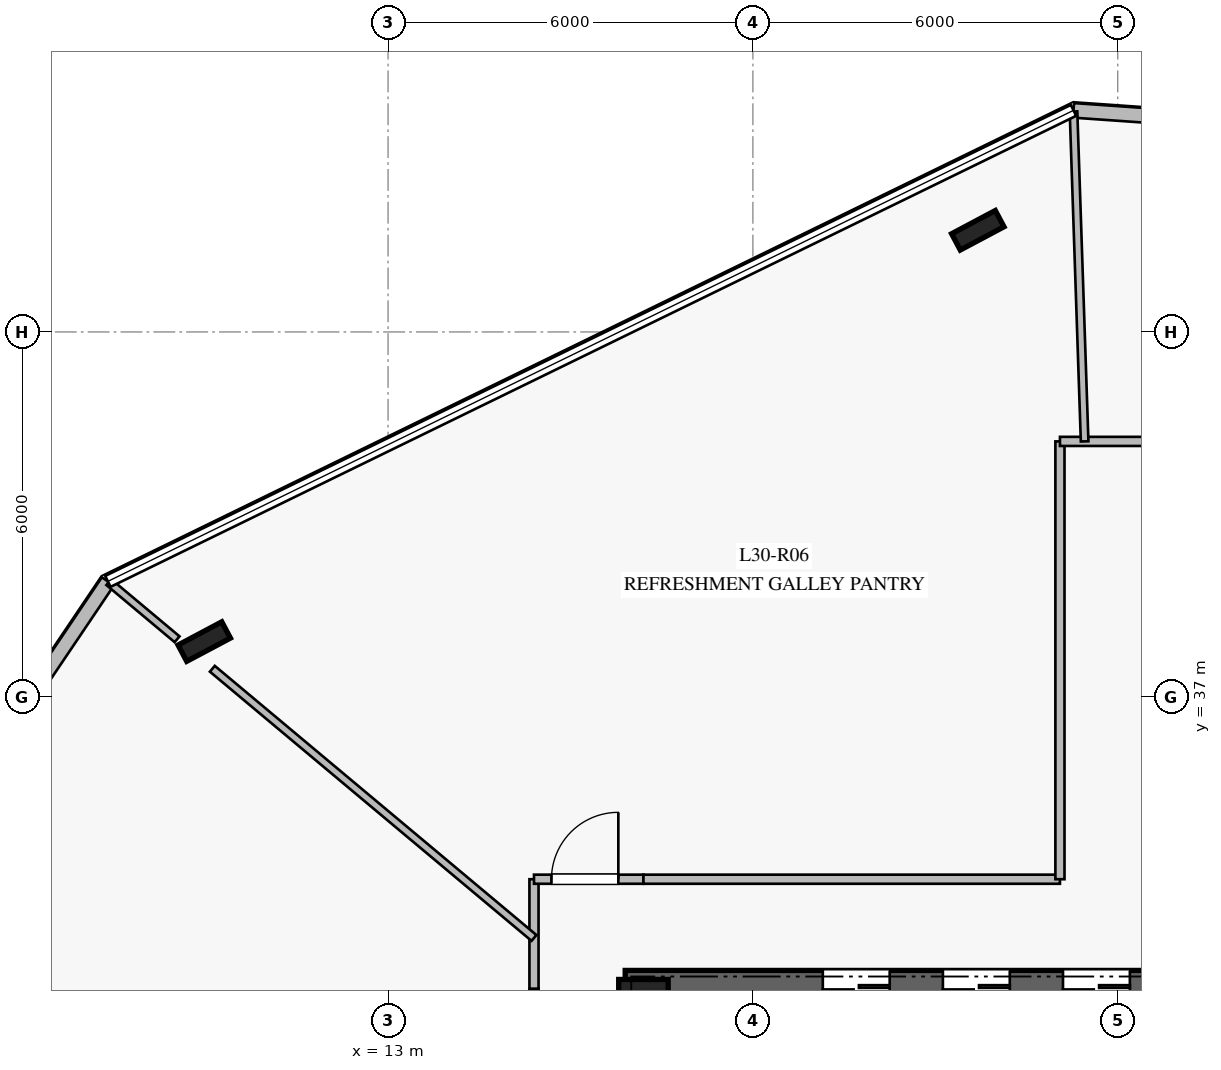
"""IFC4 building model, lengths in metres.
Left out: names, types, materials, properties, quantities, classifications, styles, units other than length and angle.
Written with IfcOpenShell. Run it as: python <this file> out.ifc"""

import sys

from ifc_helpers import new_model, si_unit, direction, frame, frame_2d, origin, origin_2d, place, context, subcontext, project, spatial, rectangle, i_section, extrude, element, fill, save


model = new_model("IFC4")
c1 = context("Model", 3, precision=1e-05, world=origin(), true_north=direction((0.0, 1.0)))
c2 = subcontext(c1, "Body", "Model", "MODEL_VIEW")
j1 = project(units=[si_unit("LENGTHUNIT", "METRE"), si_unit("PLANEANGLEUNIT", "RADIAN")], contexts=[c1])
p1 = place(None, origin())
s1 = spatial("IfcSite", under=j1, at=p1, CompositionType="ELEMENT")
p2 = place(p1, origin())
s2 = spatial("IfcBuilding", under=s1, at=p2, CompositionType="ELEMENT")
p3 = place(p2, frame((0.0, 0.0, 126.4)))
s3 = spatial("IfcBuildingStorey", under=s2, at=p3, CompositionType="ELEMENT", Elevation=126.4)
p4 = place(p3, frame((33.1, 32.2, 0.0), z_axis=(0.0, 0.0, 1.0), x_axis=(-1.0, 0.0, 0.0)))
e1 = element("IfcWall", 1, at=p4, inside=s3, PredefinedType="SHEAR", context=c2, shape_type="SweptSolid", body=[
    extrude(rectangle(XDim=16.2, YDim=0.6, at=frame_2d((8.1, 0.0))), origin(), (0.0, 0.0, 1.0), 3.76),
])
p5 = place(p4, frame((5.05, 0.0, 0.0)))
e2 = element("IfcOpeningElement", 2, at=p5, cuts=e1, PredefinedType="OPENING", context=c2, shape_type="SweptSolid", body=[
    extrude(rectangle(XDim=1.2, YDim=2.25, at=frame_2d((0.6, 1.125))), frame((0.0, 0.31, 0.0), z_axis=(0.0, -1.0, 0.0), x_axis=(1.0, 0.0, 0.0)), (0.0, 0.0, 1.0), 0.62),
])
p6 = place(p4, frame((11.85, 0.0, 0.0)))
e3 = element("IfcOpeningElement", 3, at=p6, cuts=e1, PredefinedType="OPENING", context=c2, shape_type="SweptSolid", body=[
    extrude(rectangle(XDim=1.1, YDim=2.2, at=frame_2d((0.55, 1.1))), frame((0.0, 0.31, 0.0), z_axis=(0.0, -1.0, 0.0), x_axis=(1.0, 0.0, 0.0)), (0.0, 0.0, 1.0), 0.62),
])
p7 = place(p4, frame((9.875, 0.0, 0.0)))
e4 = element("IfcOpeningElement", 4, at=p7, cuts=e1, PredefinedType="OPENING", context=c2, shape_type="SweptSolid", body=[
    extrude(rectangle(XDim=1.1, YDim=2.2, at=frame_2d((0.55, 1.1))), frame((0.0, 0.31, 0.0), z_axis=(0.0, -1.0, 0.0), x_axis=(1.0, 0.0, 0.0)), (0.0, 0.0, 1.0), 0.62),
])
p8 = place(p4, frame((7.9, 0.0, 0.0)))
e5 = element("IfcOpeningElement", 5, at=p8, cuts=e1, PredefinedType="OPENING", context=c2, shape_type="SweptSolid", body=[
    extrude(rectangle(XDim=1.1, YDim=2.2, at=frame_2d((0.55, 1.1))), frame((0.0, 0.31, 0.0), z_axis=(0.0, -1.0, 0.0), x_axis=(1.0, 0.0, 0.0)), (0.0, 0.0, 1.0), 0.62),
])
for number, where, z_axis, x_axis in (
    (6, (17.2, 32.2, 0.0), (0.0, 0.0, 1.0), (1.0, 0.0, 0.0)),
    (7, (22.699, 44.672, 0.0), (0.0, 0.0, 1.0), (0.883, 0.469, 0.0)),
    (8, (9.977, 37.908, 0.0), (0.0, 0.0, 1.0), (0.883, 0.469, 0.0)),
):
    element("IfcColumn", number, at=place(p3, frame(where, z_axis=z_axis, x_axis=x_axis)), inside=s3, PredefinedType="COLUMN", context=c2, shape_type="SweptSolid", body=[
        extrude(i_section(OverallWidth=0.303, OverallDepth=0.814, WebThickness=0.021, FlangeThickness=0.04, at=origin_2d()), origin(), (0.0, 0.0, 1.0), 4.0),
    ])
p9 = place(p3, frame((28.733, 46.332, 0.0), z_axis=(0.0, 0.0, 1.0), x_axis=(-0.997561857217, 0.069787828636, 0.0)))
e9 = element("IfcWall", 9, at=p9, inside=s3, PredefinedType="STANDARD", context=c2, shape_type="SweptSolid", body=[
    extrude(rectangle(XDim=4.471, YDim=0.24, at=frame_2d((2.235, 0.0))), origin(), (0.0, 0.0, 1.0), 3.76),
])
p10 = place(p3, frame((8.392, 38.898, 0.0), z_axis=(0.0, 0.0, 1.0), x_axis=(-0.559078804203, -0.82911452206, 0.0)))
e10 = element("IfcWall", 10, at=p10, inside=s3, PredefinedType="STANDARD", context=c2, shape_type="SweptSolid", body=[
    extrude(rectangle(XDim=4.47, YDim=0.24, at=frame_2d((2.235, 0.0))), origin(), (0.0, 0.0, 1.0), 3.76),
])
p11 = place(p3, frame((15.4, 25.95, 0.0), z_axis=(0.0, 0.0, 1.0), x_axis=(0.0, 1.0, 0.0)))
e11 = element("IfcWall", 11, at=p11, inside=s3, PredefinedType="PARTITIONING", context=c2, shape_type="SweptSolid", body=[
    extrude(rectangle(XDim=6.25, YDim=0.15, at=frame_2d((3.125, 0.0))), origin(), (0.0, 0.0, 1.0), 3.21),
])
p12 = place(p3, frame((15.4, 32.2, 0.0), z_axis=(0.0, 0.0, 1.0), x_axis=(0.0, 1.0, 0.0)))
e12 = element("IfcWall", 12, at=p12, inside=s3, PredefinedType="PARTITIONING", context=c2, shape_type="SweptSolid", body=[
    extrude(rectangle(XDim=1.8, YDim=0.15, at=frame_2d((0.9, 0.0))), origin(), (0.0, 0.0, 1.0), 3.21),
])
p13 = place(p3, frame((15.4, 34.0, 0.0), z_axis=(0.0, 0.0, 1.0), x_axis=(1.0, 0.0, 0.0)))
e13 = element("IfcWall", 13, at=p13, inside=s3, PredefinedType="PARTITIONING", context=c2, shape_type="SweptSolid", body=[
    extrude(rectangle(XDim=1.8, YDim=0.15, at=frame_2d((0.9, 0.0))), origin(), (0.0, 0.0, 1.0), 3.76),
])
p14 = place(p13, frame((0.287, 0.0, 0.0)))
e14 = element("IfcOpeningElement", 14, at=p14, cuts=e13, PredefinedType="OPENING", context=c2, shape_type="SweptSolid", body=[
    extrude(rectangle(XDim=1.1, YDim=2.2, at=frame_2d((0.55, 1.1))), frame((0.0, 0.085, 0.0), z_axis=(0.0, -1.0, 0.0), x_axis=(1.0, 0.0, 0.0)), (0.0, 0.0, 1.0), 0.17),
])
p15 = place(p3, frame((17.2, 34.0, 0.0), z_axis=(0.0, 0.0, 1.0), x_axis=(1.0, 0.0, 0.0)))
e15 = element("IfcWall", 15, at=p15, inside=s3, PredefinedType="PARTITIONING", context=c2, shape_type="SweptSolid", body=[
    extrude(rectangle(XDim=6.85, YDim=0.15, at=frame_2d((3.425, 0.0))), origin(), (0.0, 0.0, 1.0), 3.21),
])
p16 = place(p3, frame((24.05, 34.0, 0.0), z_axis=(0.0, 0.0, 1.0), x_axis=(0.0, 1.0, 0.0)))
e16 = element("IfcWall", 16, at=p16, inside=s3, PredefinedType="PARTITIONING", context=c2, shape_type="SweptSolid", body=[
    extrude(rectangle(XDim=7.2, YDim=0.15, at=frame_2d((3.6, 0.0))), origin(), (0.0, 0.0, 1.0), 3.36),
])
p17 = place(p3, frame((24.05, 41.2, 0.0), z_axis=(0.0, 0.0, 1.0), x_axis=(1.0, 0.0, 0.0)))
e17 = element("IfcWall", 17, at=p17, inside=s3, PredefinedType="PARTITIONING", context=c2, shape_type="SweptSolid", body=[
    extrude(rectangle(XDim=1.9, YDim=0.15, at=frame_2d((0.95, 0.0))), origin(), (0.0, 0.0, 1.0), 3.76),
])
p18 = place(p3, frame((24.456, 41.2, 0.0), z_axis=(0.0, 0.0, 1.0), x_axis=(-0.03373264791, 0.999430892291, 0.0)))
e18 = element("IfcWall", 18, at=p18, inside=s3, PredefinedType="PARTITIONING", context=c2, shape_type="SweptSolid", body=[
    extrude(rectangle(XDim=5.428, YDim=0.125, at=frame_2d((2.714, 0.0))), origin(), (0.0, 0.0, 1.0), 3.16),
])
p19 = place(p3, frame((15.4, 33.034, 0.0), z_axis=(0.0, 0.0, 1.0), x_axis=(-0.766876366805, 0.641794856661, 0.0)))
e19 = element("IfcWall", 19, at=p19, inside=s3, PredefinedType="PARTITIONING", context=c2, shape_type="SweptSolid", body=[
    extrude(rectangle(XDim=6.898, YDim=0.125, at=frame_2d((3.449, 0.0))), origin(), (0.0, 0.0, 1.0), 3.36),
])
p20 = place(p3, frame((9.53, 37.946, 0.0), z_axis=(0.0, 0.0, 1.0), x_axis=(-0.766853077224, 0.641822684199, 0.0)))
e20 = element("IfcWall", 20, at=p20, inside=s3, PredefinedType="PARTITIONING", context=c2, shape_type="SweptSolid", body=[
    extrude(rectangle(XDim=1.465, YDim=0.125, at=frame_2d((0.732, 0.0))), origin(), (0.0, 0.0, 1.0), 3.76),
])
p21 = place(p6, origin())
e21 = element("IfcDoor", 21, at=p21, inside=s3, OperationType="DOUBLE_DOOR_SLIDING", PredefinedType="DOOR", context=c2, shape_type="SweptSolid", body=[
    extrude(rectangle(XDim=1.1, YDim=2.2, at=frame_2d((0.55, 1.1))), frame((0.0, 0.025, 0.0), z_axis=(0.0, -1.0, 0.0), x_axis=(1.0, 0.0, 0.0)), (0.0, 0.0, 1.0), 0.05),
])
fill(e3, e21)
p22 = place(p7, origin())
e22 = element("IfcDoor", 22, at=p22, inside=s3, OperationType="DOUBLE_DOOR_SLIDING", PredefinedType="DOOR", context=c2, shape_type="SweptSolid", body=[
    extrude(rectangle(XDim=1.1, YDim=2.2, at=frame_2d((0.55, 1.1))), frame((0.0, 0.025, 0.0), z_axis=(0.0, -1.0, 0.0), x_axis=(1.0, 0.0, 0.0)), (0.0, 0.0, 1.0), 0.05),
])
fill(e4, e22)
p23 = place(p8, origin())
e23 = element("IfcDoor", 23, at=p23, inside=s3, OperationType="DOUBLE_DOOR_SLIDING", PredefinedType="DOOR", context=c2, shape_type="SweptSolid", body=[
    extrude(rectangle(XDim=1.1, YDim=2.2, at=frame_2d((0.55, 1.1))), frame((0.0, 0.025, 0.0), z_axis=(0.0, -1.0, 0.0), x_axis=(1.0, 0.0, 0.0)), (0.0, 0.0, 1.0), 0.05),
])
fill(e5, e23)
p24 = place(p14, origin())
e24 = element("IfcDoor", 24, at=p24, inside=s3, OperationType="SINGLE_SWING_RIGHT", PredefinedType="DOOR", context=c2, shape_type="SweptSolid", body=[
    extrude(rectangle(XDim=1.1, YDim=2.2, at=frame_2d((0.55, 1.1))), frame((0.0, 0.025, 0.0), z_axis=(0.0, -1.0, 0.0), x_axis=(1.0, 0.0, 0.0)), (0.0, 0.0, 1.0), 0.05),
])
fill(e14, e24)
save(model, sys.argv[1])
